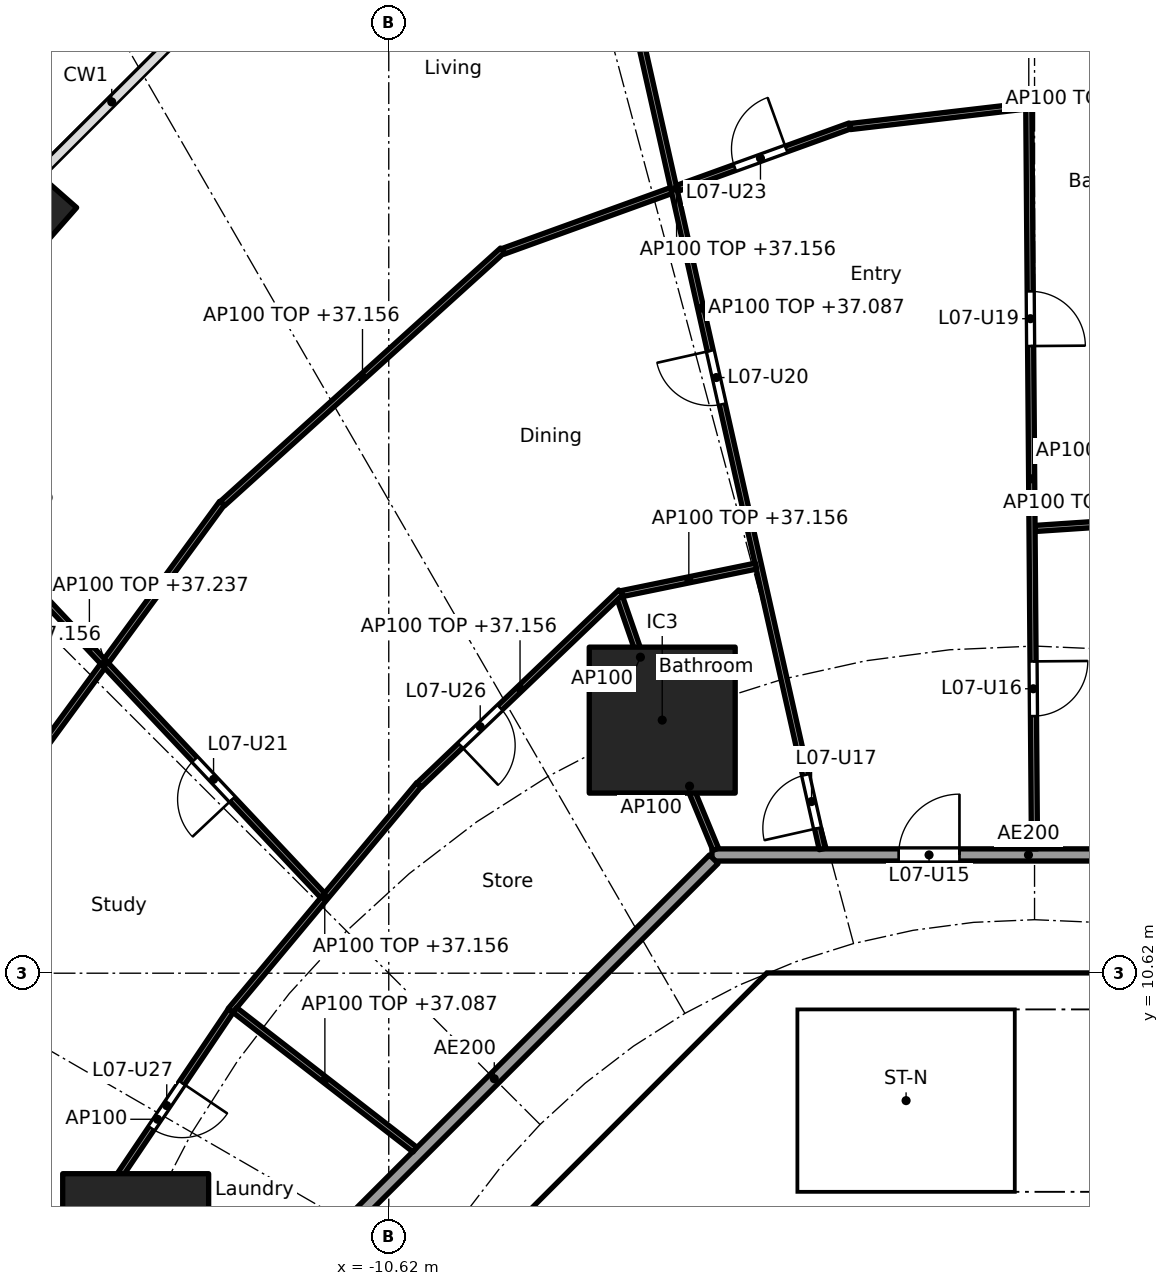
"""IFC4 building model, lengths in metres.
Left out: names, types, materials, properties, quantities, classifications, styles, units other than length and angle.
Written with IfcOpenShell. Run it as: python <this file> out.ifc"""

import sys

from ifc_helpers import new_model, si_unit, direction, frame, frame_2d, origin, origin_2d, place, context, subcontext, project, spatial, polyline, rectangle, hollow_rectangle, outline, extrude, element, fill, save


model = new_model("IFC4")
c1 = context("Model", 3, precision=1e-05, world=origin(), true_north=direction((0.0, 1.0)))
c2 = subcontext(c1, "Body", "Model", "MODEL_VIEW")
j1 = project(units=[si_unit("LENGTHUNIT", "METRE"), si_unit("PLANEANGLEUNIT", "RADIAN")], contexts=[c1])
p1 = place(None, origin())
s1 = spatial("IfcSite", under=j1, at=p1, CompositionType="ELEMENT")
p2 = place(p1, origin())
s2 = spatial("IfcBuilding", under=s1, at=p2, CompositionType="ELEMENT")
p3 = place(p2, frame((0.0, 0.0, 34.4)))
s3 = spatial("IfcBuildingStorey", under=s2, at=p3, CompositionType="ELEMENT", Elevation=34.4)
p4 = place(p3, frame((-16.552, 22.981, 0.0), z_axis=(0.0, 0.0, 1.0), x_axis=(-0.660114607735, -0.751164898445, 0.0)))
e1 = element("IfcColumn", 1, at=p4, inside=s3, PredefinedType="COLUMN", context=c2, shape_type="SweptSolid", body=[
    extrude(hollow_rectangle(XDim=1.4, YDim=0.9, WallThickness=0.05, at=origin_2d()), origin(), (0.0, 0.0, 1.0), 3.7),
])
for number, where, z_axis, x_axis in (
    (2, (-6.123, 14.782, 0.0), (0.0, 0.0, 1.0), (1.0, 0.0, 0.0)),
    (3, (-14.782, 6.123, 0.0), (0.0, 0.0, 1.0), (1.0, 0.0, 0.0)),
):
    element("IfcColumn", number, at=place(p3, frame(where, z_axis=z_axis, x_axis=x_axis)), inside=s3, PredefinedType="COLUMN", context=c2, shape_type="SweptSolid", body=[
        extrude(rectangle(XDim=2.4, YDim=2.4, at=origin_2d()), origin(), (0.0, 0.0, 1.0), 3.7),
    ])
p5 = place(p3, frame((-4.613, 9.988, 0.0), z_axis=(0.0, 0.0, 1.0), x_axis=(-0.707106781187, -0.707106781187, 0.0)))
e4 = element("IfcWall", 4, at=p5, inside=s3, PredefinedType="SHEAR", context=c2, shape_type="SweptSolid", body=[
    extrude(rectangle(XDim=7.602, YDim=0.6, at=frame_2d((3.801, 0.0))), origin(), (0.0, 0.0, 1.0), 3.44),
])
p6 = place(p5, frame((0.351, 0.0, 0.0)))
e5 = element("IfcOpeningElement", 5, at=p6, cuts=e4, PredefinedType="OPENING", context=c2, shape_type="SweptSolid", body=[
    extrude(rectangle(XDim=1.1, YDim=2.1, at=frame_2d((0.55, 1.05))), frame((0.0, 0.31, 0.0), z_axis=(0.0, -1.0, 0.0), x_axis=(1.0, 0.0, 0.0)), (0.0, 0.0, 1.0), 0.62),
])
p7 = place(p3, frame((-6.2, 4.3, 0.0), z_axis=(0.0, 0.0, 1.0), x_axis=(0.0, 1.0, 0.0)))
e6 = element("IfcWall", 6, at=p7, inside=s3, PredefinedType="PARTITIONING", context=c2, shape_type="SweptSolid", body=[
    extrude(rectangle(XDim=3.527, YDim=0.15, at=frame_2d((1.763, 0.0))), origin(), (0.0, 0.0, 1.0), 3.44),
])
p8 = place(p7, frame((0.262, 0.0, 0.0)))
e7 = element("IfcOpeningElement", 7, at=p8, cuts=e6, PredefinedType="OPENING", context=c2, shape_type="SweptSolid", body=[
    extrude(rectangle(XDim=0.9, YDim=2.1, at=frame_2d((0.45, 1.05))), frame((0.0, 0.085, 0.0), z_axis=(0.0, -1.0, 0.0), x_axis=(1.0, 0.0, 0.0)), (0.0, 0.0, 1.0), 0.17),
])
p9 = place(p7, frame((2.138, 0.0, 0.0)))
e8 = element("IfcOpeningElement", 8, at=p9, cuts=e6, PredefinedType="OPENING", context=c2, shape_type="SweptSolid", body=[
    extrude(rectangle(XDim=0.9, YDim=2.1, at=frame_2d((0.45, 1.05))), frame((0.0, 0.085, 0.0), z_axis=(0.0, -1.0, 0.0), x_axis=(1.0, 0.0, 0.0)), (0.0, 0.0, 1.0), 0.17),
])
p10 = place(p3, origin())
e9 = element("IfcWall", 9, at=p10, inside=s3, PredefinedType="SHEAR", context=c2, shape_type="SweptSolid", body=[
    extrude(outline(polyline([(-4.152, 10.025), (-4.401, 9.776), (-4.825, 10.2), (-4.401, 10.625), (4.401, 10.625), (4.825, 10.2), (4.401, 9.776), (4.152, 10.025), (-4.152, 10.025)])), origin(), (0.0, 0.0, 1.0), 3.44),
])
p11 = place(p3, origin())
e10 = element("IfcWall", 10, at=p11, inside=s3, PredefinedType="SOLIDWALL", context=c2, shape_type="SweptSolid", body=[
    extrude(outline(polyline([(-3.9, 7.025), (-4.1, 7.025), (-4.1, 10.025), (-3.9, 10.025), (-3.9, 7.025)])), origin(), (0.0, 0.0, 1.0), 3.44),
])
p12 = place(p3, origin())
e11 = element("IfcWall", 11, at=p12, inside=s3, PredefinedType="SOLIDWALL", context=c2, shape_type="SweptSolid", body=[
    extrude(outline(polyline([(4.1, 6.5), (-4.1, 6.5), (-4.1, 7.025), (4.1, 7.025), (4.1, 6.5)])), origin(), (0.0, 0.0, 1.0), 3.44),
])
p13 = place(p3, frame((-14.831, 6.135, 0.0), z_axis=(0.0, 0.0, 1.0), x_axis=(-0.969884949569, 0.243563512454, 0.0)))
e12 = element("IfcWall", 12, at=p13, inside=s3, PredefinedType="PARTITIONING", context=c2, shape_type="SweptSolid", body=[
    extrude(rectangle(XDim=8.829, YDim=0.2, at=frame_2d((4.415, 0.0))), origin(), (0.0, 0.0, 1.0), 2.756),
])
p14 = place(p3, frame((5.104, 12.565, 0.0), z_axis=(0.0, 0.0, 1.0), x_axis=(-1.0, 0.0, 0.0)))
e13 = element("IfcWall", 13, at=p14, inside=s3, PredefinedType="PARTITIONING", context=c2, shape_type="SweptSolid", body=[
    extrude(rectangle(XDim=10.409, YDim=0.2, at=frame_2d((5.205, 0.0))), origin(), (0.0, 0.0, 1.0), 3.44),
])
p15 = place(p14, frame((6.339, 0.0, 0.0)))
e14 = element("IfcOpeningElement", 14, at=p15, cuts=e13, PredefinedType="OPENING", context=c2, shape_type="SweptSolid", body=[
    extrude(rectangle(XDim=1.0, YDim=2.1, at=frame_2d((0.5, 1.05))), frame((0.0, 0.11, 0.0), z_axis=(0.0, -1.0, 0.0), x_axis=(1.0, 0.0, 0.0)), (0.0, 0.0, 1.0), 0.22),
])
p16 = place(p3, frame((-5.275, 12.494, 0.0), z_axis=(0.0, 0.0, 1.0), x_axis=(-0.707106781187, -0.707106781187, 0.0)))
e15 = element("IfcWall", 15, at=p16, inside=s3, PredefinedType="PARTITIONING", context=c2, shape_type="SweptSolid", body=[
    extrude(rectangle(XDim=10.209, YDim=0.2, at=frame_2d((5.104, 0.0))), origin(), (0.0, 0.0, 1.0), 3.44),
])
p17 = place(p3, frame((2.188, 18.079, 0.0), z_axis=(0.0, 0.0, 1.0), x_axis=(-0.997794542617, -0.066378089183, 0.0)))
e16 = element("IfcWall", 16, at=p17, inside=s3, PredefinedType="PARTITIONING", context=c2, shape_type="SweptSolid", body=[
    extrude(rectangle(XDim=2.185, YDim=0.1, at=frame_2d((1.092, 0.0))), origin(), (0.0, 0.0, 1.0), 2.756),
])
p18 = place(p3, frame((2.842, 25.229, 0.0), z_axis=(0.0, 0.0, 1.0), x_axis=(-0.993255612046, -0.115945198862, 0.0)))
e17 = element("IfcWall", 17, at=p18, inside=s3, PredefinedType="PARTITIONING", context=c2, shape_type="SweptSolid", body=[
    extrude(rectangle(XDim=5.913, YDim=0.1, at=frame_2d((2.956, 0.0))), origin(), (0.0, 0.0, 1.0), 2.756),
])
p19 = place(p3, frame((-0.001, 12.665, 0.0), z_axis=(0.0, 0.0, 1.0), x_axis=(-0.007702417287, 0.999970335944, 0.0)))
e18 = element("IfcWall", 18, at=p19, inside=s3, PredefinedType="PARTITIONING", context=c2, shape_type="SweptSolid", body=[
    extrude(rectangle(XDim=12.171, YDim=0.1, at=frame_2d((6.086, 0.0))), origin(), (0.0, 0.0, 1.0), 2.687),
])
p20 = place(p19, frame((2.183, 0.0, 0.0)))
e19 = element("IfcOpeningElement", 19, at=p20, cuts=e18, PredefinedType="OPENING", context=c2, shape_type="SweptSolid", body=[
    extrude(rectangle(XDim=0.9, YDim=2.1, at=frame_2d((0.45, 1.05))), frame((0.0, 0.06, 0.0), z_axis=(0.0, -1.0, 0.0), x_axis=(1.0, 0.0, 0.0)), (0.0, 0.0, 1.0), 0.12),
])
p21 = place(p19, frame((8.269, 0.0, 0.0)))
e20 = element("IfcOpeningElement", 20, at=p21, cuts=e18, PredefinedType="OPENING", context=c2, shape_type="SweptSolid", body=[
    extrude(rectangle(XDim=0.9, YDim=2.1, at=frame_2d((0.45, 1.05))), frame((0.0, 0.06, 0.0), z_axis=(0.0, -1.0, 0.0), x_axis=(1.0, 0.0, 0.0)), (0.0, 0.0, 1.0), 0.12),
])
p22 = place(p3, frame((-3.034, 24.554, 0.0), z_axis=(0.0, 0.0, 1.0), x_axis=(-0.940401691072, -0.340065669288, 0.0)))
e21 = element("IfcWall", 21, at=p22, inside=s3, PredefinedType="PARTITIONING", context=c2, shape_type="SweptSolid", body=[
    extrude(rectangle(XDim=6.067, YDim=0.1, at=frame_2d((3.034, 0.0))), origin(), (0.0, 0.0, 1.0), 2.756),
])
p23 = place(p22, frame((1.117, 0.0, 0.0)))
e22 = element("IfcOpeningElement", 22, at=p23, cuts=e21, PredefinedType="OPENING", context=c2, shape_type="SweptSolid", body=[
    extrude(rectangle(XDim=0.9, YDim=2.1, at=frame_2d((0.45, 1.05))), frame((0.0, 0.06, 0.0), z_axis=(0.0, -1.0, 0.0), x_axis=(1.0, 0.0, 0.0)), (0.0, 0.0, 1.0), 0.12),
])
p24 = place(p3, frame((-3.492, 12.662, 0.0), z_axis=(0.0, 0.0, 1.0), x_axis=(-0.219268088006, 0.975664648115, 0.0)))
e23 = element("IfcWall", 23, at=p24, inside=s3, PredefinedType="PARTITIONING", context=c2, shape_type="SweptSolid", body=[
    extrude(rectangle(XDim=18.23, YDim=0.1, at=frame_2d((9.115, 0.0))), origin(), (0.0, 0.0, 1.0), 2.687),
])
p25 = place(p24, frame((0.35, 0.0, 0.0)))
e24 = element("IfcOpeningElement", 24, at=p25, cuts=e23, PredefinedType="OPENING", context=c2, shape_type="SweptSolid", body=[
    extrude(rectangle(XDim=0.9, YDim=2.1, at=frame_2d((0.45, 1.05))), frame((0.0, 0.06, 0.0), z_axis=(0.0, -1.0, 0.0), x_axis=(1.0, 0.0, 0.0)), (0.0, 0.0, 1.0), 0.12),
])
p26 = place(p24, frame((7.497, 0.0, 0.0)))
e25 = element("IfcOpeningElement", 25, at=p26, cuts=e23, PredefinedType="OPENING", context=c2, shape_type="SweptSolid", body=[
    extrude(rectangle(XDim=0.9, YDim=2.1, at=frame_2d((0.45, 1.05))), frame((0.0, 0.06, 0.0), z_axis=(0.0, -1.0, 0.0), x_axis=(1.0, 0.0, 0.0)), (0.0, 0.0, 1.0), 0.12),
])
p27 = place(p24, frame((14.223, 0.0, 0.0)))
e26 = element("IfcOpeningElement", 26, at=p27, cuts=e23, PredefinedType="OPENING", context=c2, shape_type="SweptSolid", body=[
    extrude(rectangle(XDim=0.9, YDim=2.1, at=frame_2d((0.45, 1.05))), frame((0.0, 0.06, 0.0), z_axis=(0.0, -1.0, 0.0), x_axis=(1.0, 0.0, 0.0)), (0.0, 0.0, 1.0), 0.12),
])
p28 = place(p3, frame((-4.58, 17.315, 0.0), z_axis=(0.0, 0.0, 1.0), x_axis=(-0.979581941859, -0.201045316246, 0.0)))
e27 = element("IfcWall", 27, at=p28, inside=s3, PredefinedType="PARTITIONING", context=c2, shape_type="SweptSolid", body=[
    extrude(rectangle(XDim=2.256, YDim=0.1, at=frame_2d((1.128, 0.0))), origin(), (0.0, 0.0, 1.0), 2.756),
])
p29 = place(p3, frame((-5.243, 12.657, 0.0), z_axis=(0.0, 0.0, 1.0), x_axis=(-0.382719158442, 0.923864733477, 0.0)))
e28 = element("IfcWall", 28, at=p29, inside=s3, PredefinedType="PARTITIONING", context=c2, shape_type="SweptSolid", body=[
    extrude(rectangle(XDim=2.25, YDim=0.1, at=frame_2d((1.125, 0.0))), origin(), (0.0, 0.0, 1.0), 3.44),
])
p30 = place(p3, frame((-6.139, 14.83, 0.0), z_axis=(0.0, 0.0, 1.0), x_axis=(-0.327246993321, 0.944938836837, 0.0)))
e29 = element("IfcWall", 29, at=p30, inside=s3, PredefinedType="PARTITIONING", context=c2, shape_type="SweptSolid", body=[
    extrude(rectangle(XDim=2.09, YDim=0.1, at=frame_2d((1.045, 0.0))), origin(), (0.0, 0.0, 1.0), 3.44),
])
p31 = place(p3, frame((-6.803, 16.886, 0.0), z_axis=(0.0, 0.0, 1.0), x_axis=(-0.722763212502, -0.69109575216, 0.0)))
e30 = element("IfcWall", 30, at=p31, inside=s3, PredefinedType="PARTITIONING", context=c2, shape_type="SweptSolid", body=[
    extrude(rectangle(XDim=4.587, YDim=0.1, at=frame_2d((2.293, 0.0))), origin(), (0.0, 0.0, 1.0), 2.756),
])
p32 = place(p31, frame((2.75, 0.0, 0.0)))
e31 = element("IfcOpeningElement", 31, at=p32, cuts=e30, PredefinedType="OPENING", context=c2, shape_type="SweptSolid", body=[
    extrude(rectangle(XDim=0.9, YDim=2.1, at=frame_2d((0.45, 1.05))), frame((0.0, 0.06, 0.0), z_axis=(0.0, -1.0, 0.0), x_axis=(1.0, 0.0, 0.0)), (0.0, 0.0, 1.0), 0.12),
])
p33 = place(p3, frame((-8.749, 22.508, 0.0), z_axis=(0.0, 0.0, 1.0), x_axis=(-0.741720189244, -0.670709445936, 0.0)))
e32 = element("IfcWall", 32, at=p33, inside=s3, PredefinedType="PARTITIONING", context=c2, shape_type="SweptSolid", body=[
    extrude(rectangle(XDim=6.209, YDim=0.1, at=frame_2d((3.104, 0.0))), origin(), (0.0, 0.0, 1.0), 2.756),
])
p34 = place(p3, frame((-10.123, 13.72, 0.0), z_axis=(0.0, 0.0, 1.0), x_axis=(-0.64083455704, -0.767679015282, 0.0)))
e33 = element("IfcWall", 33, at=p34, inside=s3, PredefinedType="PARTITIONING", context=c2, shape_type="SweptSolid", body=[
    extrude(rectangle(XDim=4.837, YDim=0.1, at=frame_2d((2.418, 0.0))), origin(), (0.0, 0.0, 1.0), 2.756),
])
p35 = place(p3, frame((-13.362, 18.35, 0.0), z_axis=(0.0, 0.0, 1.0), x_axis=(-0.591191311491, -0.806531359104, 0.0)))
e34 = element("IfcWall", 34, at=p35, inside=s3, PredefinedType="PARTITIONING", context=c2, shape_type="SweptSolid", body=[
    extrude(rectangle(XDim=6.51, YDim=0.1, at=frame_2d((3.255, 0.0))), origin(), (0.0, 0.0, 1.0), 2.756),
])
p36 = place(p3, frame((-11.707, 11.9, 0.0), z_axis=(0.0, 0.0, 1.0), x_axis=(-0.685030806147, 0.728514100501, 0.0)))
e35 = element("IfcWall", 35, at=p36, inside=s3, PredefinedType="PARTITIONING", context=c2, shape_type="SweptSolid", body=[
    extrude(rectangle(XDim=11.201, YDim=0.1, at=frame_2d((5.601, 0.0))), origin(), (0.0, 0.0, 1.0), 2.837),
])
p37 = place(p36, frame((2.169, 0.0, 0.0)))
e36 = element("IfcOpeningElement", 36, at=p37, cuts=e35, PredefinedType="OPENING", context=c2, shape_type="SweptSolid", body=[
    extrude(rectangle(XDim=0.9, YDim=2.1, at=frame_2d((0.45, 1.05))), frame((0.0, 0.06, 0.0), z_axis=(0.0, -1.0, 0.0), x_axis=(1.0, 0.0, 0.0)), (0.0, 0.0, 1.0), 0.12),
])
p38 = place(p36, frame((7.77, 0.0, 0.0)))
e37 = element("IfcOpeningElement", 37, at=p38, cuts=e35, PredefinedType="OPENING", context=c2, shape_type="SweptSolid", body=[
    extrude(rectangle(XDim=0.9, YDim=2.1, at=frame_2d((0.45, 1.05))), frame((0.0, 0.06, 0.0), z_axis=(0.0, -1.0, 0.0), x_axis=(1.0, 0.0, 0.0)), (0.0, 0.0, 1.0), 0.12),
])
p39 = place(p3, frame((-10.19, 7.719, 0.0), z_axis=(0.0, 0.0, 1.0), x_axis=(-0.790253294643, 0.612780327937, 0.0)))
e38 = element("IfcWall", 38, at=p39, inside=s3, PredefinedType="PARTITIONING", context=c2, shape_type="SweptSolid", body=[
    extrude(rectangle(XDim=3.746, YDim=0.1, at=frame_2d((1.873, 0.0))), origin(), (0.0, 0.0, 1.0), 2.687),
])
p40 = place(p3, frame((-13.218, 10.004, 0.0), z_axis=(0.0, 0.0, 1.0), x_axis=(-0.559112679527, -0.829091678641, 0.0)))
e39 = element("IfcWall", 39, at=p40, inside=s3, PredefinedType="PARTITIONING", context=c2, shape_type="SweptSolid", body=[
    extrude(rectangle(XDim=4.308, YDim=0.1, at=frame_2d((2.154, 0.0))), origin(), (0.0, 0.0, 1.0), 3.44),
])
p41 = place(p40, frame((1.433, 0.0, 0.0)))
e40 = element("IfcOpeningElement", 40, at=p41, cuts=e39, PredefinedType="OPENING", context=c2, shape_type="SweptSolid", body=[
    extrude(rectangle(XDim=0.9, YDim=2.1, at=frame_2d((0.45, 1.05))), frame((0.0, 0.06, 0.0), z_axis=(0.0, -1.0, 0.0), x_axis=(1.0, 0.0, 0.0)), (0.0, 0.0, 1.0), 0.12),
])
p42 = place(p9, origin())
e41 = element("IfcDoor", 41, at=p42, inside=s3, OperationType="SINGLE_SWING_RIGHT", PredefinedType="DOOR", context=c2, shape_type="SweptSolid", body=[
    extrude(rectangle(XDim=0.9, YDim=2.1, at=frame_2d((0.45, 1.05))), frame((0.0, 0.025, 0.0), z_axis=(0.0, -1.0, 0.0), x_axis=(1.0, 0.0, 0.0)), (0.0, 0.0, 1.0), 0.05),
])
fill(e8, e41)
p43 = place(p6, origin())
e42 = element("IfcDoor", 42, at=p43, inside=s3, OperationType="SINGLE_SWING_RIGHT", PredefinedType="DOOR", context=c2, shape_type="SweptSolid", body=[
    extrude(rectangle(XDim=1.1, YDim=2.1, at=frame_2d((0.55, 1.05))), frame((0.0, 0.025, 0.0), z_axis=(0.0, -1.0, 0.0), x_axis=(1.0, 0.0, 0.0)), (0.0, 0.0, 1.0), 0.05),
])
fill(e5, e42)
p44 = place(p15, frame((1.0, 0.0, 0.0), x_axis=(-1.0, 0.0, 0.0)))
e43 = element("IfcDoor", 43, at=p44, inside=s3, OperationType="SINGLE_SWING_RIGHT", PredefinedType="DOOR", context=c2, shape_type="SweptSolid", body=[
    extrude(rectangle(XDim=1.0, YDim=2.1, at=frame_2d((0.5, 1.05))), frame((0.0, 0.025, 0.0), z_axis=(0.0, -1.0, 0.0), x_axis=(1.0, 0.0, 0.0)), (0.0, 0.0, 1.0), 0.05),
])
fill(e14, e43)
p45 = place(p20, frame((0.9, 0.0, 0.0), x_axis=(-1.0, 0.0, 0.0)))
e44 = element("IfcDoor", 44, at=p45, inside=s3, OperationType="SINGLE_SWING_LEFT", PredefinedType="DOOR", context=c2, shape_type="SweptSolid", body=[
    extrude(rectangle(XDim=0.9, YDim=2.1, at=frame_2d((0.45, 1.05))), frame((0.0, 0.025, 0.0), z_axis=(0.0, -1.0, 0.0), x_axis=(1.0, 0.0, 0.0)), (0.0, 0.0, 1.0), 0.05),
])
fill(e19, e44)
p46 = place(p25, origin())
e45 = element("IfcDoor", 45, at=p46, inside=s3, OperationType="SINGLE_SWING_LEFT", PredefinedType="DOOR", context=c2, shape_type="SweptSolid", body=[
    extrude(rectangle(XDim=0.9, YDim=2.1, at=frame_2d((0.45, 1.05))), frame((0.0, 0.025, 0.0), z_axis=(0.0, -1.0, 0.0), x_axis=(1.0, 0.0, 0.0)), (0.0, 0.0, 1.0), 0.05),
])
fill(e24, e45)
p47 = place(p21, frame((0.9, 0.0, 0.0), x_axis=(-1.0, 0.0, 0.0)))
e46 = element("IfcDoor", 46, at=p47, inside=s3, OperationType="SINGLE_SWING_RIGHT", PredefinedType="DOOR", context=c2, shape_type="SweptSolid", body=[
    extrude(rectangle(XDim=0.9, YDim=2.1, at=frame_2d((0.45, 1.05))), frame((0.0, 0.025, 0.0), z_axis=(0.0, -1.0, 0.0), x_axis=(1.0, 0.0, 0.0)), (0.0, 0.0, 1.0), 0.05),
])
fill(e20, e46)
p48 = place(p26, origin())
e47 = element("IfcDoor", 47, at=p48, inside=s3, OperationType="SINGLE_SWING_RIGHT", PredefinedType="DOOR", context=c2, shape_type="SweptSolid", body=[
    extrude(rectangle(XDim=0.9, YDim=2.1, at=frame_2d((0.45, 1.05))), frame((0.0, 0.025, 0.0), z_axis=(0.0, -1.0, 0.0), x_axis=(1.0, 0.0, 0.0)), (0.0, 0.0, 1.0), 0.05),
])
fill(e25, e47)
p49 = place(p37, origin())
e48 = element("IfcDoor", 48, at=p49, inside=s3, OperationType="SINGLE_SWING_LEFT", PredefinedType="DOOR", context=c2, shape_type="SweptSolid", body=[
    extrude(rectangle(XDim=0.9, YDim=2.1, at=frame_2d((0.45, 1.05))), frame((0.0, 0.025, 0.0), z_axis=(0.0, -1.0, 0.0), x_axis=(1.0, 0.0, 0.0)), (0.0, 0.0, 1.0), 0.05),
])
fill(e36, e48)
p50 = place(p23, frame((0.9, 0.0, 0.0), x_axis=(-1.0, 0.0, 0.0)))
e49 = element("IfcDoor", 49, at=p50, inside=s3, OperationType="SINGLE_SWING_RIGHT", PredefinedType="DOOR", context=c2, shape_type="SweptSolid", body=[
    extrude(rectangle(XDim=0.9, YDim=2.1, at=frame_2d((0.45, 1.05))), frame((0.0, 0.025, 0.0), z_axis=(0.0, -1.0, 0.0), x_axis=(1.0, 0.0, 0.0)), (0.0, 0.0, 1.0), 0.05),
])
fill(e22, e49)
p51 = place(p32, origin())
e50 = element("IfcDoor", 50, at=p51, inside=s3, OperationType="SINGLE_SWING_RIGHT", PredefinedType="DOOR", context=c2, shape_type="SweptSolid", body=[
    extrude(rectangle(XDim=0.9, YDim=2.1, at=frame_2d((0.45, 1.05))), frame((0.0, 0.025, 0.0), z_axis=(0.0, -1.0, 0.0), x_axis=(1.0, 0.0, 0.0)), (0.0, 0.0, 1.0), 0.05),
])
fill(e31, e50)
p52 = place(p41, origin())
e51 = element("IfcDoor", 51, at=p52, inside=s3, OperationType="SINGLE_SWING_LEFT", PredefinedType="DOOR", context=c2, shape_type="SweptSolid", body=[
    extrude(rectangle(XDim=0.9, YDim=2.1, at=frame_2d((0.45, 1.05))), frame((0.0, 0.025, 0.0), z_axis=(0.0, -1.0, 0.0), x_axis=(1.0, 0.0, 0.0)), (0.0, 0.0, 1.0), 0.05),
])
fill(e40, e51)
save(model, sys.argv[1])
